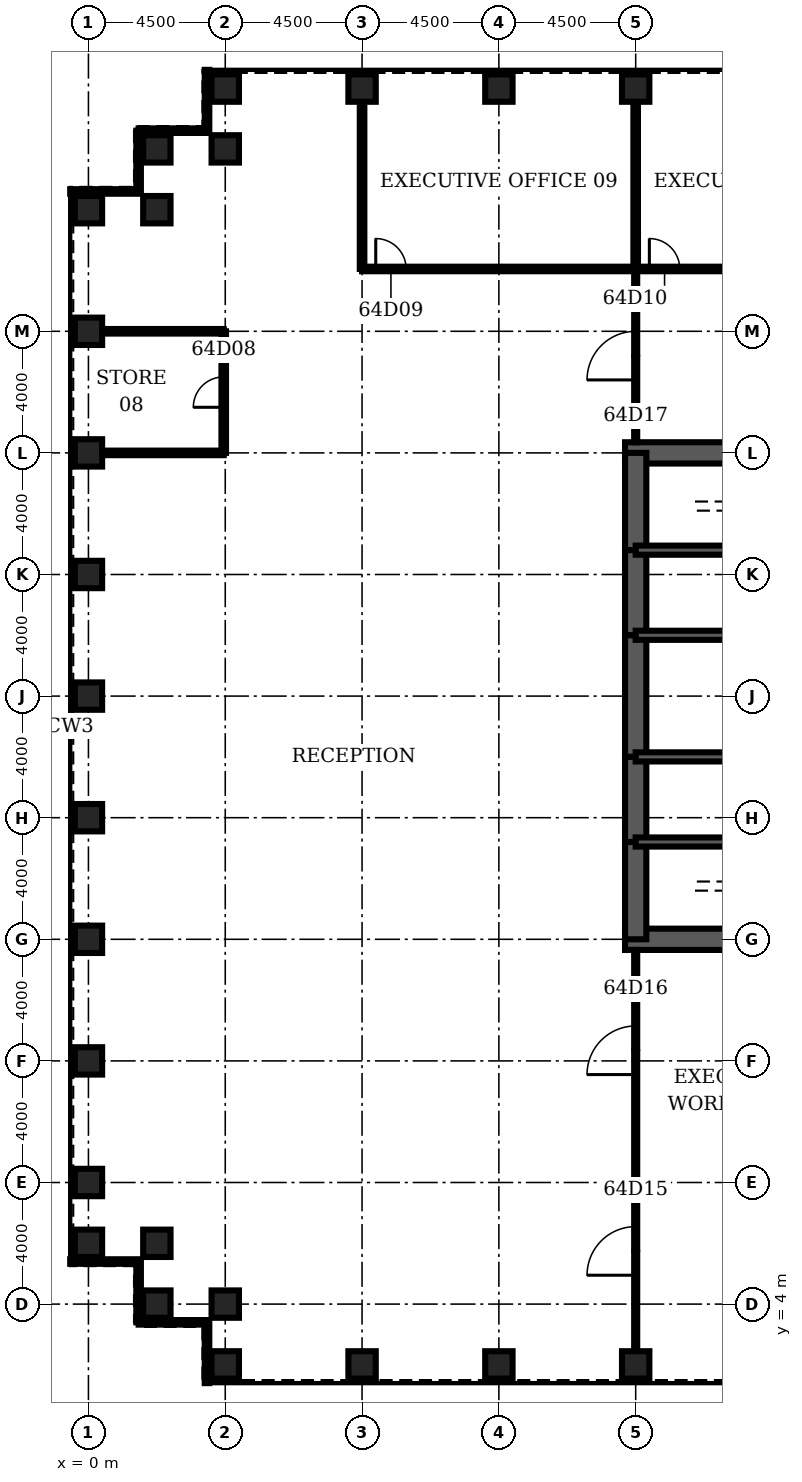
"""IFC4 building model, lengths in metres.
Left out: names, types, materials, properties, quantities, classifications, styles, units other than length and angle.
Written with IfcOpenShell. Run it as: python <this file> out.ifc"""

import sys

from ifc_helpers import new_model, si_unit, direction, frame, frame_2d, origin, origin_2d, place, context, subcontext, project, spatial, rectangle, hollow_rectangle, extrude, element, fill, save


model = new_model("IFC4")
c1 = context("Model", 3, precision=1e-05, world=origin(), true_north=direction((0.0, 1.0)))
c2 = subcontext(c1, "Body", "Model", "MODEL_VIEW")
j1 = project(units=[si_unit("LENGTHUNIT", "METRE"), si_unit("PLANEANGLEUNIT", "RADIAN")], contexts=[c1])
p1 = place(None, origin())
s1 = spatial("IfcSite", under=j1, at=p1, CompositionType="ELEMENT")
p2 = place(p1, origin())
s2 = spatial("IfcBuilding", under=s1, at=p2, CompositionType="ELEMENT")
p3 = place(p2, frame((0.0, 0.0, 283.7)))
s3 = spatial("IfcBuildingStorey", under=s2, at=p3, CompositionType="ELEMENT", Elevation=283.7)
for number, where, z_axis, x_axis in (
    (1, (4.5, 2.0, 0.0), (0.0, 0.0, 1.0), (0.0, 1.0, 0.0)),
    (2, (9.0, 2.0, 0.0), (0.0, 0.0, 1.0), (0.0, 1.0, 0.0)),
    (3, (13.5, 2.0, 0.0), (0.0, 0.0, 1.0), (0.0, 1.0, 0.0)),
    (4, (18.0, 2.0, 0.0), (0.0, 0.0, 1.0), (0.0, 1.0, 0.0)),
    (5, (18.0, 44.0, 0.0), (0.0, 0.0, 1.0), (0.0, 1.0, 0.0)),
    (6, (13.5, 44.0, 0.0), (0.0, 0.0, 1.0), (0.0, 1.0, 0.0)),
    (7, (9.0, 44.0, 0.0), (0.0, 0.0, 1.0), (0.0, 1.0, 0.0)),
    (8, (4.5, 44.0, 0.0), (0.0, 0.0, 1.0), (0.0, 1.0, 0.0)),
    (9, (4.5, 42.0, 0.0), (0.0, 0.0, 1.0), (0.0, 1.0, 0.0)),
    (10, (2.25, 42.0, 0.0), (0.0, 0.0, 1.0), (1.0, 0.0, 0.0)),
    (11, (2.25, 40.0, 0.0), (0.0, 0.0, 1.0), (1.0, 0.0, 0.0)),
    (12, (0.0, 40.0, 0.0), (0.0, 0.0, 1.0), (1.0, 0.0, 0.0)),
    (13, (0.0, 36.0, 0.0), (0.0, 0.0, 1.0), (1.0, 0.0, 0.0)),
    (14, (0.0, 32.0, 0.0), (0.0, 0.0, 1.0), (1.0, 0.0, 0.0)),
    (15, (0.0, 28.0, 0.0), (0.0, 0.0, 1.0), (1.0, 0.0, 0.0)),
    (16, (0.0, 24.0, 0.0), (0.0, 0.0, 1.0), (1.0, 0.0, 0.0)),
    (17, (0.0, 20.0, 0.0), (0.0, 0.0, 1.0), (1.0, 0.0, 0.0)),
    (18, (0.0, 16.0, 0.0), (0.0, 0.0, 1.0), (1.0, 0.0, 0.0)),
    (19, (0.0, 12.0, 0.0), (0.0, 0.0, 1.0), (1.0, 0.0, 0.0)),
    (20, (0.0, 8.0, 0.0), (0.0, 0.0, 1.0), (1.0, 0.0, 0.0)),
    (21, (0.0, 6.0, 0.0), (0.0, 0.0, 1.0), (1.0, 0.0, 0.0)),
    (22, (2.25, 6.0, 0.0), (0.0, 0.0, 1.0), (1.0, 0.0, 0.0)),
    (23, (2.25, 4.0, 0.0), (0.0, 0.0, 1.0), (1.0, 0.0, 0.0)),
    (24, (4.5, 4.0, 0.0), (0.0, 0.0, 1.0), (0.0, 1.0, 0.0)),
):
    element("IfcColumn", number, at=place(p3, frame(where, z_axis=z_axis, x_axis=x_axis)), inside=s3, PredefinedType="COLUMN", context=c2, shape_type="SweptSolid", body=[
        extrude(hollow_rectangle(XDim=0.9, YDim=0.9, WallThickness=0.07, at=origin_2d()), origin(), (0.0, 0.0, 1.0), 4.2),
    ])
for number, where, z_axis, x_axis in (
    (25, (17.65, 16.0, 0.0), (0.0, 0.0, 1.0), (1.0, 0.0, 0.0)),
    (26, (27.0, 32.0, 0.0), (0.0, 0.0, 1.0), (-1.0, 0.0, 0.0)),
):
    element("IfcWall", number, at=place(p3, frame(where, z_axis=z_axis, x_axis=x_axis)), inside=s3, PredefinedType="SHEAR", context=c2, shape_type="SweptSolid", body=[
        extrude(rectangle(XDim=9.35, YDim=0.7, at=frame_2d((4.675, 0.0))), origin(), (0.0, 0.0, 1.0), 4.2),
    ])
p4 = place(p3, frame((18.0, 32.0, 0.0), z_axis=(0.0, 0.0, 1.0), x_axis=(0.0, -1.0, 0.0)))
e27 = element("IfcWall", 27, at=p4, inside=s3, PredefinedType="SHEAR", context=c2, shape_type="SweptSolid", body=[
    extrude(rectangle(XDim=3.2, YDim=0.7, at=frame_2d((1.6, 0.0))), origin(), (0.0, 0.0, 1.0), 4.2),
])
p5 = place(p3, frame((18.0, 28.8, 0.0), z_axis=(0.0, 0.0, 1.0), x_axis=(0.0, -1.0, 0.0)))
e28 = element("IfcWall", 28, at=p5, inside=s3, PredefinedType="SHEAR", context=c2, shape_type="SweptSolid", body=[
    extrude(rectangle(XDim=2.8, YDim=0.7, at=frame_2d((1.4, 0.0))), origin(), (0.0, 0.0, 1.0), 4.2),
])
p6 = place(p5, frame((0.4, 0.0, 0.0)))
e29 = element("IfcOpeningElement", 29, at=p6, cuts=e28, PredefinedType="OPENING", context=c2, shape_type="SweptSolid", body=[
    extrude(rectangle(XDim=1.8, YDim=2.1, at=frame_2d((0.9, 1.05))), frame((0.0, 0.36, 0.0), z_axis=(0.0, -1.0, 0.0), x_axis=(1.0, 0.0, 0.0)), (0.0, 0.0, 1.0), 0.72),
])
p7 = place(p3, frame((18.0, 26.0, 0.0), z_axis=(0.0, 0.0, 1.0), x_axis=(0.0, -1.0, 0.0)))
e30 = element("IfcWall", 30, at=p7, inside=s3, PredefinedType="SHEAR", context=c2, shape_type="SweptSolid", body=[
    extrude(rectangle(XDim=4.0, YDim=0.7, at=frame_2d((2.0, 0.0))), origin(), (0.0, 0.0, 1.0), 4.2),
])
p8 = place(p3, frame((18.0, 22.0, 0.0), z_axis=(0.0, 0.0, 1.0), x_axis=(0.0, -1.0, 0.0)))
e31 = element("IfcWall", 31, at=p8, inside=s3, PredefinedType="SHEAR", context=c2, shape_type="SweptSolid", body=[
    extrude(rectangle(XDim=2.8, YDim=0.7, at=frame_2d((1.4, 0.0))), origin(), (0.0, 0.0, 1.0), 4.2),
])
p9 = place(p8, frame((0.6, 0.0, 0.0)))
e32 = element("IfcOpeningElement", 32, at=p9, cuts=e31, PredefinedType="OPENING", context=c2, shape_type="SweptSolid", body=[
    extrude(rectangle(XDim=1.8, YDim=2.1, at=frame_2d((0.9, 1.05))), frame((0.0, 0.36, 0.0), z_axis=(0.0, -1.0, 0.0), x_axis=(1.0, 0.0, 0.0)), (0.0, 0.0, 1.0), 0.72),
])
p10 = place(p3, frame((18.0, 19.2, 0.0), z_axis=(0.0, 0.0, 1.0), x_axis=(0.0, -1.0, 0.0)))
e33 = element("IfcWall", 33, at=p10, inside=s3, PredefinedType="SHEAR", context=c2, shape_type="SweptSolid", body=[
    extrude(rectangle(XDim=3.2, YDim=0.7, at=frame_2d((1.6, 0.0))), origin(), (0.0, 0.0, 1.0), 4.2),
])
p11 = place(p3, frame((18.0, 19.2, 0.0), z_axis=(0.0, 0.0, 1.0), x_axis=(1.0, 0.0, 0.0)))
e34 = element("IfcWall", 34, at=p11, inside=s3, PredefinedType="SOLIDWALL", context=c2, shape_type="SweptSolid", body=[
    extrude(rectangle(XDim=9.0, YDim=0.3, at=frame_2d((4.5, 0.0))), origin(), (0.0, 0.0, 1.0), 4.2),
])
p12 = place(p11, frame((0.65, 0.0, 0.0)))
e35 = element("IfcOpeningElement", 35, at=p12, cuts=e34, PredefinedType="OPENING", context=c2, shape_type="SweptSolid", body=[
    extrude(rectangle(XDim=1.0, YDim=2.1, at=frame_2d((0.5, 1.05))), frame((0.0, 0.16, 0.0), z_axis=(0.0, -1.0, 0.0), x_axis=(1.0, 0.0, 0.0)), (0.0, 0.0, 1.0), 0.32),
])
p13 = place(p3, frame((18.0, 28.8, 0.0), z_axis=(0.0, 0.0, 1.0), x_axis=(1.0, 0.0, 0.0)))
e36 = element("IfcWall", 36, at=p13, inside=s3, PredefinedType="SOLIDWALL", context=c2, shape_type="SweptSolid", body=[
    extrude(rectangle(XDim=9.0, YDim=0.3, at=frame_2d((4.5, 0.0))), origin(), (0.0, 0.0, 1.0), 4.2),
])
p14 = place(p13, frame((0.65, 0.0, 0.0)))
e37 = element("IfcOpeningElement", 37, at=p14, cuts=e36, PredefinedType="OPENING", context=c2, shape_type="SweptSolid", body=[
    extrude(rectangle(XDim=1.0, YDim=2.1, at=frame_2d((0.5, 1.05))), frame((0.0, 0.16, 0.0), z_axis=(0.0, -1.0, 0.0), x_axis=(1.0, 0.0, 0.0)), (0.0, 0.0, 1.0), 0.32),
])
p15 = place(p3, frame((18.0, 22.0, 0.0), z_axis=(0.0, 0.0, 1.0), x_axis=(1.0, 0.0, 0.0)))
e38 = element("IfcWall", 38, at=p15, inside=s3, PredefinedType="SOLIDWALL", context=c2, shape_type="SweptSolid", body=[
    extrude(rectangle(XDim=6.0, YDim=0.3, at=frame_2d((3.0, 0.0))), origin(), (0.0, 0.0, 1.0), 4.2),
])
p16 = place(p15, frame((4.4, 0.0, 0.0)))
e39 = element("IfcOpeningElement", 39, at=p16, cuts=e38, PredefinedType="OPENING", context=c2, shape_type="SweptSolid", body=[
    extrude(rectangle(XDim=1.0, YDim=2.1, at=frame_2d((0.5, 1.05))), frame((0.0, 0.16, 0.0), z_axis=(0.0, -1.0, 0.0), x_axis=(1.0, 0.0, 0.0)), (0.0, 0.0, 1.0), 0.32),
])
p17 = place(p15, frame((0.6, 0.0, 0.0)))
e40 = element("IfcOpeningElement", 40, at=p17, cuts=e38, PredefinedType="OPENING", context=c2, shape_type="SweptSolid", body=[
    extrude(rectangle(XDim=1.0, YDim=2.1, at=frame_2d((0.5, 1.05))), frame((0.0, 0.16, 0.0), z_axis=(0.0, -1.0, 0.0), x_axis=(1.0, 0.0, 0.0)), (0.0, 0.0, 1.0), 0.32),
])
p18 = place(p3, frame((18.0, 26.0, 0.0), z_axis=(0.0, 0.0, 1.0), x_axis=(1.0, 0.0, 0.0)))
e41 = element("IfcWall", 41, at=p18, inside=s3, PredefinedType="SOLIDWALL", context=c2, shape_type="SweptSolid", body=[
    extrude(rectangle(XDim=6.0, YDim=0.3, at=frame_2d((3.0, 0.0))), origin(), (0.0, 0.0, 1.0), 4.2),
])
p19 = place(p3, frame((19.925, 22.15, 0.0), z_axis=(0.0, 0.0, 1.0), x_axis=(0.0, 1.0, 0.0)))
e42 = element("IfcWall", 42, at=p19, inside=s3, PredefinedType="PARTITIONING", context=c2, shape_type="SweptSolid", body=[
    extrude(rectangle(XDim=3.7, YDim=0.15, at=frame_2d((1.85, 0.0))), origin(), (0.0, 0.0, 1.0), 3.0),
])
for number, where, z_axis, x_axis in (
    (43, (0.45, 32.0, 0.0), (0.0, 0.0, 1.0), (1.0, 0.0, 0.0)),
    (44, (0.45, 36.0, 0.0), (0.0, 0.0, 1.0), (1.0, 0.0, 0.0)),
):
    element("IfcWall", number, at=place(p3, frame(where, z_axis=z_axis, x_axis=x_axis)), inside=s3, PredefinedType="PARTITIONING", context=c2, shape_type="SweptSolid", body=[
        extrude(rectangle(XDim=4.0, YDim=0.15, at=frame_2d((2.0, 0.0))), origin(), (0.0, 0.0, 1.0), 3.0),
    ])
p20 = place(p3, frame((9.0, 38.05, 0.0), z_axis=(0.0, 0.0, 1.0), x_axis=(1.0, 0.0, 0.0)))
e45 = element("IfcWall", 45, at=p20, inside=s3, PredefinedType="PARTITIONING", context=c2, shape_type="SweptSolid", body=[
    extrude(rectangle(XDim=54.0, YDim=0.15, at=frame_2d((27.0, 0.0))), origin(), (0.0, 0.0, 1.0), 3.0),
])
p21 = place(p20, frame((0.45, 0.0, 0.0)))
e46 = element("IfcOpeningElement", 46, at=p21, cuts=e45, PredefinedType="OPENING", context=c2, shape_type="SweptSolid", body=[
    extrude(rectangle(XDim=1.0, YDim=2.1, at=frame_2d((0.5, 1.05))), frame((0.0, 0.085, 0.0), z_axis=(0.0, -1.0, 0.0), x_axis=(1.0, 0.0, 0.0)), (0.0, 0.0, 1.0), 0.17),
])
p22 = place(p20, frame((9.45, 0.0, 0.0)))
e47 = element("IfcOpeningElement", 47, at=p22, cuts=e45, PredefinedType="OPENING", context=c2, shape_type="SweptSolid", body=[
    extrude(rectangle(XDim=1.0, YDim=2.1, at=frame_2d((0.5, 1.05))), frame((0.0, 0.085, 0.0), z_axis=(0.0, -1.0, 0.0), x_axis=(1.0, 0.0, 0.0)), (0.0, 0.0, 1.0), 0.17),
])
p23 = place(p20, frame((18.45, 0.0, 0.0)))
e48 = element("IfcOpeningElement", 48, at=p23, cuts=e45, PredefinedType="OPENING", context=c2, shape_type="SweptSolid", body=[
    extrude(rectangle(XDim=1.0, YDim=2.1, at=frame_2d((0.5, 1.05))), frame((0.0, 0.085, 0.0), z_axis=(0.0, -1.0, 0.0), x_axis=(1.0, 0.0, 0.0)), (0.0, 0.0, 1.0), 0.17),
])
p24 = place(p20, frame((27.45, 0.0, 0.0)))
e49 = element("IfcOpeningElement", 49, at=p24, cuts=e45, PredefinedType="OPENING", context=c2, shape_type="SweptSolid", body=[
    extrude(rectangle(XDim=1.0, YDim=2.1, at=frame_2d((0.5, 1.05))), frame((0.0, 0.085, 0.0), z_axis=(0.0, -1.0, 0.0), x_axis=(1.0, 0.0, 0.0)), (0.0, 0.0, 1.0), 0.17),
])
p25 = place(p20, frame((36.45, 0.0, 0.0)))
e50 = element("IfcOpeningElement", 50, at=p25, cuts=e45, PredefinedType="OPENING", context=c2, shape_type="SweptSolid", body=[
    extrude(rectangle(XDim=1.0, YDim=2.1, at=frame_2d((0.5, 1.05))), frame((0.0, 0.085, 0.0), z_axis=(0.0, -1.0, 0.0), x_axis=(1.0, 0.0, 0.0)), (0.0, 0.0, 1.0), 0.17),
])
p26 = place(p20, frame((45.45, 0.0, 0.0)))
e51 = element("IfcOpeningElement", 51, at=p26, cuts=e45, PredefinedType="OPENING", context=c2, shape_type="SweptSolid", body=[
    extrude(rectangle(XDim=1.0, YDim=2.1, at=frame_2d((0.5, 1.05))), frame((0.0, 0.085, 0.0), z_axis=(0.0, -1.0, 0.0), x_axis=(1.0, 0.0, 0.0)), (0.0, 0.0, 1.0), 0.17),
])
p27 = place(p3, frame((4.45, 32.0, 0.0), z_axis=(0.0, 0.0, 1.0), x_axis=(0.0, 1.0, 0.0)))
e52 = element("IfcWall", 52, at=p27, inside=s3, PredefinedType="PARTITIONING", context=c2, shape_type="SweptSolid", body=[
    extrude(rectangle(XDim=4.0, YDim=0.15, at=frame_2d((2.0, 0.0))), origin(), (0.0, 0.0, 1.0), 3.0),
])
p28 = place(p27, frame((1.5, 0.0, 0.0)))
e53 = element("IfcOpeningElement", 53, at=p28, cuts=e52, PredefinedType="OPENING", context=c2, shape_type="SweptSolid", body=[
    extrude(rectangle(XDim=1.0, YDim=2.1, at=frame_2d((0.5, 1.05))), frame((0.0, 0.085, 0.0), z_axis=(0.0, -1.0, 0.0), x_axis=(1.0, 0.0, 0.0)), (0.0, 0.0, 1.0), 0.17),
])
p29 = place(p3, frame((9.0, 38.05, 0.0), z_axis=(0.0, 0.0, 1.0), x_axis=(0.0, 1.0, 0.0)))
e54 = element("IfcWall", 54, at=p29, inside=s3, PredefinedType="PARTITIONING", context=c2, shape_type="SweptSolid", body=[
    extrude(rectangle(XDim=5.5, YDim=0.15, at=frame_2d((2.75, 0.0))), origin(), (0.0, 0.0, 1.0), 3.0),
])
p30 = place(p3, frame((18.0, 2.45, 0.0), z_axis=(0.0, 0.0, 1.0), x_axis=(0.0, 1.0, 0.0)))
e55 = element("IfcWall", 55, at=p30, inside=s3, PredefinedType="PARTITIONING", context=c2, shape_type="SweptSolid", body=[
    extrude(rectangle(XDim=13.2, YDim=0.1, at=frame_2d((6.6, 0.0))), origin(), (0.0, 0.0, 1.0), 3.0),
])
p31 = place(p30, frame((2.5, 0.0, 0.0)))
e56 = element("IfcOpeningElement", 56, at=p31, cuts=e55, PredefinedType="OPENING", context=c2, shape_type="SweptSolid", body=[
    extrude(rectangle(XDim=1.6, YDim=2.1, at=frame_2d((0.8, 1.05))), frame((0.0, 0.06, 0.0), z_axis=(0.0, -1.0, 0.0), x_axis=(1.0, 0.0, 0.0)), (0.0, 0.0, 1.0), 0.12),
])
p32 = place(p30, frame((9.1, 0.0, 0.0)))
e57 = element("IfcOpeningElement", 57, at=p32, cuts=e55, PredefinedType="OPENING", context=c2, shape_type="SweptSolid", body=[
    extrude(rectangle(XDim=1.6, YDim=2.1, at=frame_2d((0.8, 1.05))), frame((0.0, 0.06, 0.0), z_axis=(0.0, -1.0, 0.0), x_axis=(1.0, 0.0, 0.0)), (0.0, 0.0, 1.0), 0.12),
])
p33 = place(p3, frame((18.0, 32.35, 0.0), z_axis=(0.0, 0.0, 1.0), x_axis=(0.0, 1.0, 0.0)))
e58 = element("IfcWall", 58, at=p33, inside=s3, PredefinedType="PARTITIONING", context=c2, shape_type="SweptSolid", body=[
    extrude(rectangle(XDim=5.7, YDim=0.1, at=frame_2d((2.85, 0.0))), origin(), (0.0, 0.0, 1.0), 3.0),
])
p34 = place(p33, frame((2.05, 0.0, 0.0)))
e59 = element("IfcOpeningElement", 59, at=p34, cuts=e58, PredefinedType="OPENING", context=c2, shape_type="SweptSolid", body=[
    extrude(rectangle(XDim=1.6, YDim=2.1, at=frame_2d((0.8, 1.05))), frame((0.0, 0.06, 0.0), z_axis=(0.0, -1.0, 0.0), x_axis=(1.0, 0.0, 0.0)), (0.0, 0.0, 1.0), 0.12),
])
p35 = place(p3, frame((18.0, 38.05, 0.0), z_axis=(0.0, 0.0, 1.0), x_axis=(0.0, 1.0, 0.0)))
e60 = element("IfcWall", 60, at=p35, inside=s3, PredefinedType="PARTITIONING", context=c2, shape_type="SweptSolid", body=[
    extrude(rectangle(XDim=5.5, YDim=0.15, at=frame_2d((2.75, 0.0))), origin(), (0.0, 0.0, 1.0), 3.0),
])
p36 = place(p3, frame((3.9, 44.6, 0.0), z_axis=(0.0, 0.0, 1.0), x_axis=(0.0, -1.0, 0.0)))
e61 = element("IfcWall", 61, at=p36, inside=s3, PredefinedType="ELEMENTEDWALL", context=c2, shape_type="SweptSolid", body=[
    extrude(rectangle(XDim=2.0, YDim=0.15, at=frame_2d((1.0, 0.0))), origin(), (0.0, 0.0, 1.0), 4.04),
])
p37 = place(p3, frame((3.9, 42.6, 0.0), z_axis=(0.0, 0.0, 1.0), x_axis=(-1.0, 0.0, 0.0)))
e62 = element("IfcWall", 62, at=p37, inside=s3, PredefinedType="ELEMENTEDWALL", context=c2, shape_type="SweptSolid", body=[
    extrude(rectangle(XDim=2.25, YDim=0.15, at=frame_2d((1.125, 0.0))), origin(), (0.0, 0.0, 1.0), 4.04),
])
p38 = place(p3, frame((1.65, 42.6, 0.0), z_axis=(0.0, 0.0, 1.0), x_axis=(0.0, -1.0, 0.0)))
e63 = element("IfcWall", 63, at=p38, inside=s3, PredefinedType="ELEMENTEDWALL", context=c2, shape_type="SweptSolid", body=[
    extrude(rectangle(XDim=2.0, YDim=0.15, at=frame_2d((1.0, 0.0))), origin(), (0.0, 0.0, 1.0), 4.04),
])
for number, where, z_axis, x_axis in (
    (64, (1.65, 40.6, 0.0), (0.0, 0.0, 1.0), (-1.0, 0.0, 0.0)),
    (65, (-0.6, 5.4, 0.0), (0.0, 0.0, 1.0), (1.0, 0.0, 0.0)),
):
    element("IfcWall", number, at=place(p3, frame(where, z_axis=z_axis, x_axis=x_axis)), inside=s3, PredefinedType="ELEMENTEDWALL", context=c2, shape_type="SweptSolid", body=[
        extrude(rectangle(XDim=2.25, YDim=0.15, at=frame_2d((1.125, 0.0))), origin(), (0.0, 0.0, 1.0), 4.04),
    ])
p39 = place(p3, frame((1.65, 5.4, 0.0), z_axis=(0.0, 0.0, 1.0), x_axis=(0.0, -1.0, 0.0)))
e66 = element("IfcWall", 66, at=p39, inside=s3, PredefinedType="ELEMENTEDWALL", context=c2, shape_type="SweptSolid", body=[
    extrude(rectangle(XDim=2.0, YDim=0.15, at=frame_2d((1.0, 0.0))), origin(), (0.0, 0.0, 1.0), 4.04),
])
p40 = place(p3, frame((1.65, 3.4, 0.0), z_axis=(0.0, 0.0, 1.0), x_axis=(1.0, 0.0, 0.0)))
e67 = element("IfcWall", 67, at=p40, inside=s3, PredefinedType="ELEMENTEDWALL", context=c2, shape_type="SweptSolid", body=[
    extrude(rectangle(XDim=2.25, YDim=0.15, at=frame_2d((1.125, 0.0))), origin(), (0.0, 0.0, 1.0), 4.04),
])
p41 = place(p3, frame((3.9, 3.4, 0.0), z_axis=(0.0, 0.0, 1.0), x_axis=(0.0, -1.0, 0.0)))
e68 = element("IfcWall", 68, at=p41, inside=s3, PredefinedType="ELEMENTEDWALL", context=c2, shape_type="SweptSolid", body=[
    extrude(rectangle(XDim=2.0, YDim=0.15, at=frame_2d((1.0, 0.0))), origin(), (0.0, 0.0, 1.0), 4.04),
])
p42 = place(p28, origin())
e69 = element("IfcDoor", 69, at=p42, inside=s3, OperationType="SINGLE_SWING_LEFT", PredefinedType="DOOR", context=c2, shape_type="SweptSolid", body=[
    extrude(rectangle(XDim=1.0, YDim=2.1, at=frame_2d((0.5, 1.05))), frame((0.0, 0.025, 0.0), z_axis=(0.0, -1.0, 0.0), x_axis=(1.0, 0.0, 0.0)), (0.0, 0.0, 1.0), 0.05),
])
fill(e53, e69)
p43 = place(p21, origin())
e70 = element("IfcDoor", 70, at=p43, inside=s3, OperationType="SINGLE_SWING_LEFT", PredefinedType="DOOR", context=c2, shape_type="SweptSolid", body=[
    extrude(rectangle(XDim=1.0, YDim=2.1, at=frame_2d((0.5, 1.05))), frame((0.0, 0.025, 0.0), z_axis=(0.0, -1.0, 0.0), x_axis=(1.0, 0.0, 0.0)), (0.0, 0.0, 1.0), 0.05),
])
fill(e46, e70)
p44 = place(p22, origin())
e71 = element("IfcDoor", 71, at=p44, inside=s3, OperationType="SINGLE_SWING_LEFT", PredefinedType="DOOR", context=c2, shape_type="SweptSolid", body=[
    extrude(rectangle(XDim=1.0, YDim=2.1, at=frame_2d((0.5, 1.05))), frame((0.0, 0.025, 0.0), z_axis=(0.0, -1.0, 0.0), x_axis=(1.0, 0.0, 0.0)), (0.0, 0.0, 1.0), 0.05),
])
fill(e47, e71)
p45 = place(p31, origin())
e72 = element("IfcDoor", 72, at=p45, inside=s3, OperationType="SINGLE_SWING_LEFT", PredefinedType="DOOR", context=c2, shape_type="SweptSolid", body=[
    extrude(rectangle(XDim=1.6, YDim=2.1, at=frame_2d((0.8, 1.05))), frame((0.0, 0.025, 0.0), z_axis=(0.0, -1.0, 0.0), x_axis=(1.0, 0.0, 0.0)), (0.0, 0.0, 1.0), 0.05),
])
fill(e56, e72)
p46 = place(p32, origin())
e73 = element("IfcDoor", 73, at=p46, inside=s3, OperationType="SINGLE_SWING_LEFT", PredefinedType="DOOR", context=c2, shape_type="SweptSolid", body=[
    extrude(rectangle(XDim=1.6, YDim=2.1, at=frame_2d((0.8, 1.05))), frame((0.0, 0.025, 0.0), z_axis=(0.0, -1.0, 0.0), x_axis=(1.0, 0.0, 0.0)), (0.0, 0.0, 1.0), 0.05),
])
fill(e57, e73)
p47 = place(p34, origin())
e74 = element("IfcDoor", 74, at=p47, inside=s3, OperationType="SINGLE_SWING_LEFT", PredefinedType="DOOR", context=c2, shape_type="SweptSolid", body=[
    extrude(rectangle(XDim=1.6, YDim=2.1, at=frame_2d((0.8, 1.05))), frame((0.0, 0.025, 0.0), z_axis=(0.0, -1.0, 0.0), x_axis=(1.0, 0.0, 0.0)), (0.0, 0.0, 1.0), 0.05),
])
fill(e59, e74)
p48 = place(p12, origin())
e75 = element("IfcDoor", 75, at=p48, inside=s3, OperationType="SINGLE_SWING_LEFT", PredefinedType="DOOR", context=c2, shape_type="SweptSolid", body=[
    extrude(rectangle(XDim=1.0, YDim=2.1, at=frame_2d((0.5, 1.05))), frame((0.0, 0.025, 0.0), z_axis=(0.0, -1.0, 0.0), x_axis=(1.0, 0.0, 0.0)), (0.0, 0.0, 1.0), 0.05),
])
fill(e35, e75)
p49 = place(p14, origin())
e76 = element("IfcDoor", 76, at=p49, inside=s3, OperationType="SINGLE_SWING_LEFT", PredefinedType="DOOR", context=c2, shape_type="SweptSolid", body=[
    extrude(rectangle(XDim=1.0, YDim=2.1, at=frame_2d((0.5, 1.05))), frame((0.0, 0.025, 0.0), z_axis=(0.0, -1.0, 0.0), x_axis=(1.0, 0.0, 0.0)), (0.0, 0.0, 1.0), 0.05),
])
fill(e37, e76)
p50 = place(p9, origin())
e77 = element("IfcDoor", 77, at=p50, inside=s3, OperationType="SINGLE_SWING_LEFT", PredefinedType="DOOR", context=c2, shape_type="SweptSolid", body=[
    extrude(rectangle(XDim=1.8, YDim=2.1, at=frame_2d((0.9, 1.05))), frame((0.0, 0.35, 0.0), z_axis=(0.0, -1.0, 0.0), x_axis=(1.0, 0.0, 0.0)), (0.0, 0.0, 1.0), 0.699),
])
fill(e32, e77)
p51 = place(p6, origin())
e78 = element("IfcDoor", 78, at=p51, inside=s3, OperationType="SINGLE_SWING_LEFT", PredefinedType="DOOR", context=c2, shape_type="SweptSolid", body=[
    extrude(rectangle(XDim=1.8, YDim=2.1, at=frame_2d((0.9, 1.05))), frame((0.0, 0.35, 0.0), z_axis=(0.0, -1.0, 0.0), x_axis=(1.0, 0.0, 0.0)), (0.0, 0.0, 1.0), 0.699),
])
fill(e29, e78)
p52 = place(p17, origin())
e79 = element("IfcDoor", 79, at=p52, inside=s3, OperationType="SINGLE_SWING_LEFT", PredefinedType="DOOR", context=c2, shape_type="SweptSolid", body=[
    extrude(rectangle(XDim=1.0, YDim=2.1, at=frame_2d((0.5, 1.05))), frame((0.0, 0.025, 0.0), z_axis=(0.0, -1.0, 0.0), x_axis=(1.0, 0.0, 0.0)), (0.0, 0.0, 1.0), 0.05),
])
fill(e40, e79)
save(model, sys.argv[1])
